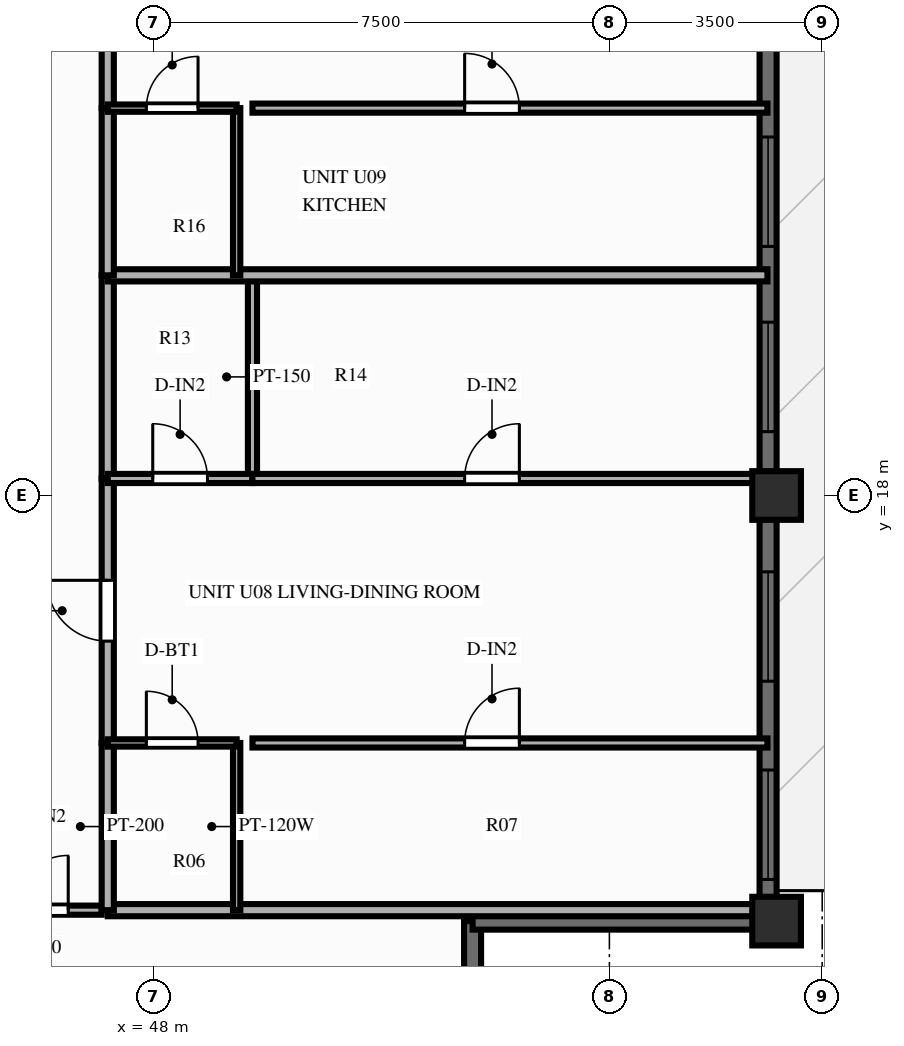
"""IFC4 building model, lengths in metres.
Left out: names, types, materials, properties, quantities, classifications, styles, units other than length and angle.
Written with IfcOpenShell. Run it as: python <this file> out.ifc"""

import sys

from ifc_helpers import new_model, si_unit, direction, frame, frame_2d, origin, origin_2d, place, context, subcontext, project, spatial, rectangle, extrude, source, transform, mapped, element, fill, save


model = new_model("IFC4")
c1 = context("Model", 3, precision=1e-05, world=origin(), true_north=direction((0.0, 1.0)))
c2 = subcontext(c1, "Body", "Model", "MODEL_VIEW")
j1 = project(units=[si_unit("LENGTHUNIT", "METRE"), si_unit("PLANEANGLEUNIT", "RADIAN")], contexts=[c1])
p1 = place(None, origin())
s1 = spatial("IfcSite", under=j1, at=p1, CompositionType="ELEMENT")
p2 = place(p1, origin())
s2 = spatial("IfcBuilding", under=s1, at=p2, CompositionType="ELEMENT")
p3 = place(p2, frame((0.0, 0.0, 172.9)))
s3 = spatial("IfcBuildingStorey", under=s2, at=p3, CompositionType="ELEMENT", Elevation=172.9)
m1 = source(origin(), c2, "Body", "SweptSolid", [
    extrude(rectangle(XDim=0.8, YDim=0.8, at=origin_2d()), origin(), (0.0, 0.0, 1.0), 3.9),
])
for number, where, z_axis, x_axis in (
    (1, (58.25, 11.0, 0.0), (0.0, 0.0, 1.0), (1.0, 0.0, 0.0)),
    (2, (58.25, 18.0, 0.0), (0.0, 0.0, 1.0), (1.0, 0.0, 0.0)),
):
    element("IfcColumn", number, at=place(p3, frame(where, z_axis=z_axis, x_axis=x_axis)), inside=s3, PredefinedType="COLUMN", context=c2, shape_type="MappedRepresentation", body=[
        mapped(m1, transform((0.0, 0.0, 0.0), scale=1.0)),
    ])
p4 = place(p3, frame((58.11, 11.0, 0.0), z_axis=(0.0, 0.0, 1.0), x_axis=(0.0, 1.0, 0.0)))
e3 = element("IfcWall", 3, at=p4, inside=s3, PredefinedType="SOLIDWALL", context=c2, shape_type="SweptSolid", body=[
    extrude(rectangle(XDim=32.0, YDim=0.28, at=frame_2d((16.0, 0.0))), origin(), (0.0, 0.0, 1.0), 2.79),
])
p5 = place(p4, frame((0.685, 0.0, 0.85)))
e4 = element("IfcOpeningElement", 4, at=p5, cuts=e3, PredefinedType="OPENING", context=c2, shape_type="SweptSolid", body=[
    extrude(rectangle(XDim=1.8, YDim=1.65, at=frame_2d((0.9, 0.825))), frame((0.0, 0.152, 0.0), z_axis=(0.0, -1.0, 0.0), x_axis=(1.0, 0.0, 0.0)), (0.0, 0.0, 1.0), 0.304),
])
p6 = place(p4, frame((3.945, 0.0, 0.85)))
e5 = element("IfcOpeningElement", 5, at=p6, cuts=e3, PredefinedType="OPENING", context=c2, shape_type="SweptSolid", body=[
    extrude(rectangle(XDim=1.8, YDim=1.65, at=frame_2d((0.9, 0.825))), frame((0.0, 0.152, 0.0), z_axis=(0.0, -1.0, 0.0), x_axis=(1.0, 0.0, 0.0)), (0.0, 0.0, 1.0), 0.304),
])
p7 = place(p4, frame((8.051, 0.0, 0.85)))
e6 = element("IfcOpeningElement", 6, at=p7, cuts=e3, PredefinedType="OPENING", context=c2, shape_type="SweptSolid", body=[
    extrude(rectangle(XDim=1.8, YDim=1.65, at=frame_2d((0.9, 0.825))), frame((0.0, 0.152, 0.0), z_axis=(0.0, -1.0, 0.0), x_axis=(1.0, 0.0, 0.0)), (0.0, 0.0, 1.0), 0.304),
])
p8 = place(p4, frame((11.096, 0.0, 0.85)))
e7 = element("IfcOpeningElement", 7, at=p8, cuts=e3, PredefinedType="OPENING", context=c2, shape_type="SweptSolid", body=[
    extrude(rectangle(XDim=1.8, YDim=1.65, at=frame_2d((0.9, 0.825))), frame((0.0, 0.152, 0.0), z_axis=(0.0, -1.0, 0.0), x_axis=(1.0, 0.0, 0.0)), (0.0, 0.0, 1.0), 0.304),
])
p9 = place(p4, frame((16.257, 0.0, 0.0), z_axis=(0.0, 0.0, 1.0), x_axis=(-1.0, 0.0, 0.0)))
e8 = element("IfcOpeningElement", 8, at=p9, cuts=e3, PredefinedType="OPENING", context=c2, shape_type="SweptSolid", body=[
    extrude(rectangle(XDim=1.6, YDim=2.15, at=frame_2d((0.8, 1.075))), frame((0.0, 0.152, 0.0), z_axis=(0.0, -1.0, 0.0), x_axis=(1.0, 0.0, 0.0)), (0.0, 0.0, 1.0), 0.304),
])
p10 = place(p4, frame((18.56, 0.0, 0.85)))
e9 = element("IfcOpeningElement", 9, at=p10, cuts=e3, PredefinedType="OPENING", context=c2, shape_type="SweptSolid", body=[
    extrude(rectangle(XDim=1.8, YDim=1.65, at=frame_2d((0.9, 0.825))), frame((0.0, 0.152, 0.0), z_axis=(0.0, -1.0, 0.0), x_axis=(1.0, 0.0, 0.0)), (0.0, 0.0, 1.0), 0.304),
])
p11 = place(p4, frame((21.854, 0.0, 0.85)))
e10 = element("IfcOpeningElement", 10, at=p11, cuts=e3, PredefinedType="OPENING", context=c2, shape_type="SweptSolid", body=[
    extrude(rectangle(XDim=1.8, YDim=1.65, at=frame_2d((0.9, 0.825))), frame((0.0, 0.152, 0.0), z_axis=(0.0, -1.0, 0.0), x_axis=(1.0, 0.0, 0.0)), (0.0, 0.0, 1.0), 0.304),
])
p12 = place(p4, frame((25.711, 0.0, 0.85)))
e11 = element("IfcOpeningElement", 11, at=p12, cuts=e3, PredefinedType="OPENING", context=c2, shape_type="SweptSolid", body=[
    extrude(rectangle(XDim=1.8, YDim=1.65, at=frame_2d((0.9, 0.825))), frame((0.0, 0.152, 0.0), z_axis=(0.0, -1.0, 0.0), x_axis=(1.0, 0.0, 0.0)), (0.0, 0.0, 1.0), 0.304),
])
p13 = place(p4, frame((28.971, 0.0, 0.85)))
e12 = element("IfcOpeningElement", 12, at=p13, cuts=e3, PredefinedType="OPENING", context=c2, shape_type="SweptSolid", body=[
    extrude(rectangle(XDim=1.8, YDim=1.65, at=frame_2d((0.9, 0.825))), frame((0.0, 0.152, 0.0), z_axis=(0.0, -1.0, 0.0), x_axis=(1.0, 0.0, 0.0)), (0.0, 0.0, 1.0), 0.304),
])
for number, where, z_axis, x_axis in (
    (13, (53.25, 6.08, 0.0), (0.0, 0.0, 1.0), (0.0, 1.0, 0.0)),
    (14, (53.25, 11.0, 0.0), (0.0, 0.0, 1.0), (1.0, 0.0, 0.0)),
):
    element("IfcWall", number, at=place(p3, frame(where, z_axis=z_axis, x_axis=x_axis)), inside=s3, PredefinedType="SOLIDWALL", context=c2, shape_type="SweptSolid", body=[
        extrude(rectangle(XDim=4.92, YDim=0.28, at=frame_2d((2.46, 0.0))), origin(), (0.0, 0.0, 1.0), 2.79),
    ])
p14 = place(p3, frame((44.82, 11.18, 0.0), z_axis=(0.0, 0.0, 1.0), x_axis=(1.0, 0.0, 0.0)))
e15 = element("IfcWall", 15, at=p14, inside=s3, PredefinedType="PARTITIONING", context=c2, shape_type="SweptSolid", body=[
    extrude(rectangle(XDim=2.33, YDim=0.15, at=frame_2d((1.165, 0.0))), origin(), (0.0, 0.0, 1.0), 3.69),
])
p15 = place(p14, frame((0.88, 0.0, 0.0)))
e16 = element("IfcOpeningElement", 16, at=p15, cuts=e15, PredefinedType="OPENING", context=c2, shape_type="SweptSolid", body=[
    extrude(rectangle(XDim=0.9, YDim=2.1, at=frame_2d((0.45, 1.05))), frame((0.0, 0.087, 0.0), z_axis=(0.0, -1.0, 0.0), x_axis=(1.0, 0.0, 0.0)), (0.0, 0.0, 1.0), 0.174),
])
p16 = place(p3, frame((47.25, 11.18, 0.0), z_axis=(0.0, 0.0, 1.0), x_axis=(1.0, 0.0, 0.0)))
e17 = element("IfcWall", 17, at=p16, inside=s3, PredefinedType="PARTITIONING", context=c2, shape_type="SweptSolid", body=[
    extrude(rectangle(XDim=10.85, YDim=0.2, at=frame_2d((5.425, 0.0))), origin(), (0.0, 0.0, 1.0), 3.69),
])
p17 = place(p3, frame((47.25, 11.18, 0.0), z_axis=(0.0, 0.0, 1.0), x_axis=(0.0, 1.0, 0.0)))
e18 = element("IfcWall", 18, at=p17, inside=s3, PredefinedType="PARTITIONING", context=c2, shape_type="SweptSolid", body=[
    extrude(rectangle(XDim=2.75, YDim=0.2, at=frame_2d((1.375, 0.0))), origin(), (0.0, 0.0, 1.0), 3.69),
])
p18 = place(p3, frame((47.25, 13.93, 0.0), z_axis=(0.0, 0.0, 1.0), x_axis=(0.0, 1.0, 0.0)))
e19 = element("IfcWall", 19, at=p18, inside=s3, PredefinedType="PARTITIONING", context=c2, shape_type="SweptSolid", body=[
    extrude(rectangle(XDim=4.35, YDim=0.2, at=frame_2d((2.175, 0.0))), origin(), (0.0, 0.0, 1.0), 3.69),
])
p19 = place(p18, frame((1.675, 0.0, 0.0)))
e20 = element("IfcOpeningElement", 20, at=p19, cuts=e19, PredefinedType="OPENING", context=c2, shape_type="SweptSolid", body=[
    extrude(rectangle(XDim=1.0, YDim=2.15, at=frame_2d((0.5, 1.075))), frame((0.0, 0.112, 0.0), z_axis=(0.0, -1.0, 0.0), x_axis=(1.0, 0.0, 0.0)), (0.0, 0.0, 1.0), 0.224),
])
p20 = place(p3, frame((47.25, 18.28, 0.0), z_axis=(0.0, 0.0, 1.0), x_axis=(0.0, 1.0, 0.0)))
e21 = element("IfcWall", 21, at=p20, inside=s3, PredefinedType="PARTITIONING", context=c2, shape_type="SweptSolid", body=[
    extrude(rectangle(XDim=3.341, YDim=0.2, at=frame_2d((1.67, 0.0))), origin(), (0.0, 0.0, 1.0), 3.69),
])
p21 = place(p3, frame((49.37, 11.18, 0.0), z_axis=(0.0, 0.0, 1.0), x_axis=(0.0, 1.0, 0.0)))
e22 = element("IfcWall", 22, at=p21, inside=s3, PredefinedType="PARTITIONING", context=c2, shape_type="SweptSolid", body=[
    extrude(rectangle(XDim=2.75, YDim=0.12, at=frame_2d((1.375, 0.0))), origin(), (0.0, 0.0, 1.0), 3.69),
])
p22 = place(p3, frame((49.63, 18.28, 0.0), z_axis=(0.0, 0.0, 1.0), x_axis=(0.0, 1.0, 0.0)))
e23 = element("IfcWall", 23, at=p22, inside=s3, PredefinedType="PARTITIONING", context=c2, shape_type="SweptSolid", body=[
    extrude(rectangle(XDim=3.341, YDim=0.15, at=frame_2d((1.67, 0.0))), origin(), (0.0, 0.0, 1.0), 3.69),
])
p23 = place(p3, frame((47.25, 13.93, 0.0), z_axis=(0.0, 0.0, 1.0), x_axis=(1.0, 0.0, 0.0)))
e24 = element("IfcWall", 24, at=p23, inside=s3, PredefinedType="PARTITIONING", context=c2, shape_type="SweptSolid", body=[
    extrude(rectangle(XDim=2.12, YDim=0.12, at=frame_2d((1.06, 0.0))), origin(), (0.0, 0.0, 1.0), 3.69),
])
p24 = place(p23, frame((0.635, 0.0, 0.0)))
e25 = element("IfcOpeningElement", 25, at=p24, cuts=e24, PredefinedType="OPENING", context=c2, shape_type="SweptSolid", body=[
    extrude(rectangle(XDim=0.85, YDim=2.05, at=frame_2d((0.425, 1.025))), frame((0.0, 0.072, 0.0), z_axis=(0.0, -1.0, 0.0), x_axis=(1.0, 0.0, 0.0)), (0.0, 0.0, 1.0), 0.144),
])
p25 = place(p3, frame((49.63, 13.93, 0.0), z_axis=(0.0, 0.0, 1.0), x_axis=(1.0, 0.0, 0.0)))
e26 = element("IfcWall", 26, at=p25, inside=s3, PredefinedType="PARTITIONING", context=c2, shape_type="SweptSolid", body=[
    extrude(rectangle(XDim=8.47, YDim=0.15, at=frame_2d((4.235, 0.0))), origin(), (0.0, 0.0, 1.0), 3.69),
])
p26 = place(p25, frame((3.49, 0.0, 0.0)))
e27 = element("IfcOpeningElement", 27, at=p26, cuts=e26, PredefinedType="OPENING", context=c2, shape_type="SweptSolid", body=[
    extrude(rectangle(XDim=0.9, YDim=2.1, at=frame_2d((0.45, 1.05))), frame((0.0, 0.087, 0.0), z_axis=(0.0, -1.0, 0.0), x_axis=(1.0, 0.0, 0.0)), (0.0, 0.0, 1.0), 0.174),
])
p27 = place(p3, frame((47.25, 18.28, 0.0), z_axis=(0.0, 0.0, 1.0), x_axis=(1.0, 0.0, 0.0)))
e28 = element("IfcWall", 28, at=p27, inside=s3, PredefinedType="PARTITIONING", context=c2, shape_type="SweptSolid", body=[
    extrude(rectangle(XDim=2.38, YDim=0.15, at=frame_2d((1.19, 0.0))), origin(), (0.0, 0.0, 1.0), 3.69),
])
p28 = place(p27, frame((0.74, 0.0, 0.0)))
e29 = element("IfcOpeningElement", 29, at=p28, cuts=e28, PredefinedType="OPENING", context=c2, shape_type="SweptSolid", body=[
    extrude(rectangle(XDim=0.9, YDim=2.1, at=frame_2d((0.45, 1.05))), frame((0.0, 0.087, 0.0), z_axis=(0.0, -1.0, 0.0), x_axis=(1.0, 0.0, 0.0)), (0.0, 0.0, 1.0), 0.174),
])
p29 = place(p3, frame((49.63, 18.28, 0.0), z_axis=(0.0, 0.0, 1.0), x_axis=(1.0, 0.0, 0.0)))
e30 = element("IfcWall", 30, at=p29, inside=s3, PredefinedType="PARTITIONING", context=c2, shape_type="SweptSolid", body=[
    extrude(rectangle(XDim=8.47, YDim=0.15, at=frame_2d((4.235, 0.0))), origin(), (0.0, 0.0, 1.0), 3.69),
])
p30 = place(p29, frame((3.49, 0.0, 0.0)))
e31 = element("IfcOpeningElement", 31, at=p30, cuts=e30, PredefinedType="OPENING", context=c2, shape_type="SweptSolid", body=[
    extrude(rectangle(XDim=0.9, YDim=2.1, at=frame_2d((0.45, 1.05))), frame((0.0, 0.087, 0.0), z_axis=(0.0, -1.0, 0.0), x_axis=(1.0, 0.0, 0.0)), (0.0, 0.0, 1.0), 0.174),
])
p31 = place(p3, frame((47.25, 21.621, 0.0), z_axis=(0.0, 0.0, 1.0), x_axis=(1.0, 0.0, 0.0)))
e32 = element("IfcWall", 32, at=p31, inside=s3, PredefinedType="PARTITIONING", context=c2, shape_type="SweptSolid", body=[
    extrude(rectangle(XDim=10.85, YDim=0.2, at=frame_2d((5.425, 0.0))), origin(), (0.0, 0.0, 1.0), 3.29),
])
p32 = place(p3, frame((47.25, 21.621, 0.0), z_axis=(0.0, 0.0, 1.0), x_axis=(0.0, 1.0, 0.0)))
e33 = element("IfcWall", 33, at=p32, inside=s3, PredefinedType="PARTITIONING", context=c2, shape_type="SweptSolid", body=[
    extrude(rectangle(XDim=2.75, YDim=0.2, at=frame_2d((1.375, 0.0))), origin(), (0.0, 0.0, 1.0), 3.69),
])
p33 = place(p3, frame((47.25, 24.371, 0.0), z_axis=(0.0, 0.0, 1.0), x_axis=(0.0, 1.0, 0.0)))
e34 = element("IfcWall", 34, at=p33, inside=s3, PredefinedType="PARTITIONING", context=c2, shape_type="SweptSolid", body=[
    extrude(rectangle(XDim=4.171, YDim=0.2, at=frame_2d((2.085, 0.0))), origin(), (0.0, 0.0, 1.0), 3.69),
])
p34 = place(p33, frame((1.585, 0.0, 0.0)))
e35 = element("IfcOpeningElement", 35, at=p34, cuts=e34, PredefinedType="OPENING", context=c2, shape_type="SweptSolid", body=[
    extrude(rectangle(XDim=1.0, YDim=2.15, at=frame_2d((0.5, 1.075))), frame((0.0, 0.112, 0.0), z_axis=(0.0, -1.0, 0.0), x_axis=(1.0, 0.0, 0.0)), (0.0, 0.0, 1.0), 0.224),
])
p35 = place(p3, frame((49.37, 21.621, 0.0), z_axis=(0.0, 0.0, 1.0), x_axis=(0.0, 1.0, 0.0)))
e36 = element("IfcWall", 36, at=p35, inside=s3, PredefinedType="PARTITIONING", context=c2, shape_type="SweptSolid", body=[
    extrude(rectangle(XDim=2.75, YDim=0.12, at=frame_2d((1.375, 0.0))), origin(), (0.0, 0.0, 1.0), 3.69),
])
p36 = place(p3, frame((47.25, 24.371, 0.0), z_axis=(0.0, 0.0, 1.0), x_axis=(1.0, 0.0, 0.0)))
e37 = element("IfcWall", 37, at=p36, inside=s3, PredefinedType="PARTITIONING", context=c2, shape_type="SweptSolid", body=[
    extrude(rectangle(XDim=2.12, YDim=0.12, at=frame_2d((1.06, 0.0))), origin(), (0.0, 0.0, 1.0), 3.69),
])
p37 = place(p36, frame((0.635, 0.0, 0.0)))
e38 = element("IfcOpeningElement", 38, at=p37, cuts=e37, PredefinedType="OPENING", context=c2, shape_type="SweptSolid", body=[
    extrude(rectangle(XDim=0.85, YDim=2.05, at=frame_2d((0.425, 1.025))), frame((0.0, 0.072, 0.0), z_axis=(0.0, -1.0, 0.0), x_axis=(1.0, 0.0, 0.0)), (0.0, 0.0, 1.0), 0.144),
])
p38 = place(p3, frame((49.63, 24.371, 0.0), z_axis=(0.0, 0.0, 1.0), x_axis=(1.0, 0.0, 0.0)))
e39 = element("IfcWall", 39, at=p38, inside=s3, PredefinedType="PARTITIONING", context=c2, shape_type="SweptSolid", body=[
    extrude(rectangle(XDim=8.47, YDim=0.15, at=frame_2d((4.235, 0.0))), origin(), (0.0, 0.0, 1.0), 3.69),
])
p39 = place(p38, frame((3.49, 0.0, 0.0)))
e40 = element("IfcOpeningElement", 40, at=p39, cuts=e39, PredefinedType="OPENING", context=c2, shape_type="SweptSolid", body=[
    extrude(rectangle(XDim=0.9, YDim=2.1, at=frame_2d((0.45, 1.05))), frame((0.0, 0.087, 0.0), z_axis=(0.0, -1.0, 0.0), x_axis=(1.0, 0.0, 0.0)), (0.0, 0.0, 1.0), 0.174),
])
m2 = source(origin(), c2, "Body", "SweptSolid", [
    extrude(rectangle(XDim=1.8, YDim=1.65, at=frame_2d((0.9, 0.825))), frame((0.0, 0.03, 0.0), z_axis=(0.0, -1.0, 0.0), x_axis=(1.0, 0.0, 0.0)), (0.0, 0.0, 1.0), 0.06),
])
p40 = place(p5, origin())
e41 = element("IfcWindow", 41, at=p40, inside=s3, PartitioningType="SINGLE_PANEL", PredefinedType="WINDOW", context=c2, shape_type="MappedRepresentation", body=[
    mapped(m2, transform((0.0, 0.0, 0.0), scale=1.0)),
])
fill(e4, e41)
p41 = place(p6, origin())
e42 = element("IfcWindow", 42, at=p41, inside=s3, PartitioningType="SINGLE_PANEL", PredefinedType="WINDOW", context=c2, shape_type="MappedRepresentation", body=[
    mapped(m2, transform((0.0, 0.0, 0.0), scale=1.0)),
])
fill(e5, e42)
p42 = place(p7, origin())
e43 = element("IfcWindow", 43, at=p42, inside=s3, PartitioningType="SINGLE_PANEL", PredefinedType="WINDOW", context=c2, shape_type="MappedRepresentation", body=[
    mapped(m2, transform((0.0, 0.0, 0.0), scale=1.0)),
])
fill(e6, e43)
p43 = place(p8, origin())
e44 = element("IfcWindow", 44, at=p43, inside=s3, PartitioningType="SINGLE_PANEL", PredefinedType="WINDOW", context=c2, shape_type="MappedRepresentation", body=[
    mapped(m2, transform((0.0, 0.0, 0.0), scale=1.0)),
])
fill(e7, e44)
m3 = source(origin(), c2, "Body", "SweptSolid", [
    extrude(rectangle(XDim=0.9, YDim=2.1, at=frame_2d((0.45, 1.05))), frame((0.0, 0.025, 0.0), z_axis=(0.0, -1.0, 0.0), x_axis=(1.0, 0.0, 0.0)), (0.0, 0.0, 1.0), 0.05),
])
p44 = place(p15, origin())
e45 = element("IfcDoor", 45, at=p44, inside=s3, OperationType="SINGLE_SWING_RIGHT", PredefinedType="DOOR", context=c2, shape_type="MappedRepresentation", body=[
    mapped(m3, transform((0.0, 0.0, 0.0), scale=1.0)),
])
fill(e16, e45)
m4 = source(origin(), c2, "Body", "SweptSolid", [
    extrude(rectangle(XDim=1.0, YDim=2.15, at=frame_2d((0.5, 1.075))), frame((0.0, 0.025, 0.0), z_axis=(0.0, -1.0, 0.0), x_axis=(1.0, 0.0, 0.0)), (0.0, 0.0, 1.0), 0.05),
])
p45 = place(p19, origin())
e46 = element("IfcDoor", 46, at=p45, inside=s3, OperationType="SINGLE_SWING_RIGHT", PredefinedType="DOOR", context=c2, shape_type="MappedRepresentation", body=[
    mapped(m4, transform((0.0, 0.0, 0.0), scale=1.0)),
])
fill(e20, e46)
m5 = source(origin(), c2, "Body", "SweptSolid", [
    extrude(rectangle(XDim=0.85, YDim=2.05, at=frame_2d((0.425, 1.025))), frame((0.0, 0.025, 0.0), z_axis=(0.0, -1.0, 0.0), x_axis=(1.0, 0.0, 0.0)), (0.0, 0.0, 1.0), 0.05),
])
p46 = place(p24, origin())
e47 = element("IfcDoor", 47, at=p46, inside=s3, OperationType="SINGLE_SWING_LEFT", PredefinedType="DOOR", context=c2, shape_type="MappedRepresentation", body=[
    mapped(m5, transform((0.0, 0.0, 0.0), scale=1.0)),
])
fill(e25, e47)
p47 = place(p26, origin())
e48 = element("IfcDoor", 48, at=p47, inside=s3, OperationType="SINGLE_SWING_RIGHT", PredefinedType="DOOR", context=c2, shape_type="MappedRepresentation", body=[
    mapped(m3, transform((0.0, 0.0, 0.0), scale=1.0)),
])
fill(e27, e48)
p48 = place(p28, origin())
e49 = element("IfcDoor", 49, at=p48, inside=s3, OperationType="SINGLE_SWING_LEFT", PredefinedType="DOOR", context=c2, shape_type="MappedRepresentation", body=[
    mapped(m3, transform((0.0, 0.0, 0.0), scale=1.0)),
])
fill(e29, e49)
p49 = place(p30, origin())
e50 = element("IfcDoor", 50, at=p49, inside=s3, OperationType="SINGLE_SWING_RIGHT", PredefinedType="DOOR", context=c2, shape_type="MappedRepresentation", body=[
    mapped(m3, transform((0.0, 0.0, 0.0), scale=1.0)),
])
fill(e31, e50)
p50 = place(p37, origin())
e51 = element("IfcDoor", 51, at=p50, inside=s3, OperationType="SINGLE_SWING_RIGHT", PredefinedType="DOOR", context=c2, shape_type="MappedRepresentation", body=[
    mapped(m5, transform((0.0, 0.0, 0.0), scale=1.0)),
])
fill(e38, e51)
p51 = place(p39, origin())
e52 = element("IfcDoor", 52, at=p51, inside=s3, OperationType="SINGLE_SWING_LEFT", PredefinedType="DOOR", context=c2, shape_type="MappedRepresentation", body=[
    mapped(m3, transform((0.0, 0.0, 0.0), scale=1.0)),
])
fill(e40, e52)
save(model, sys.argv[1])
